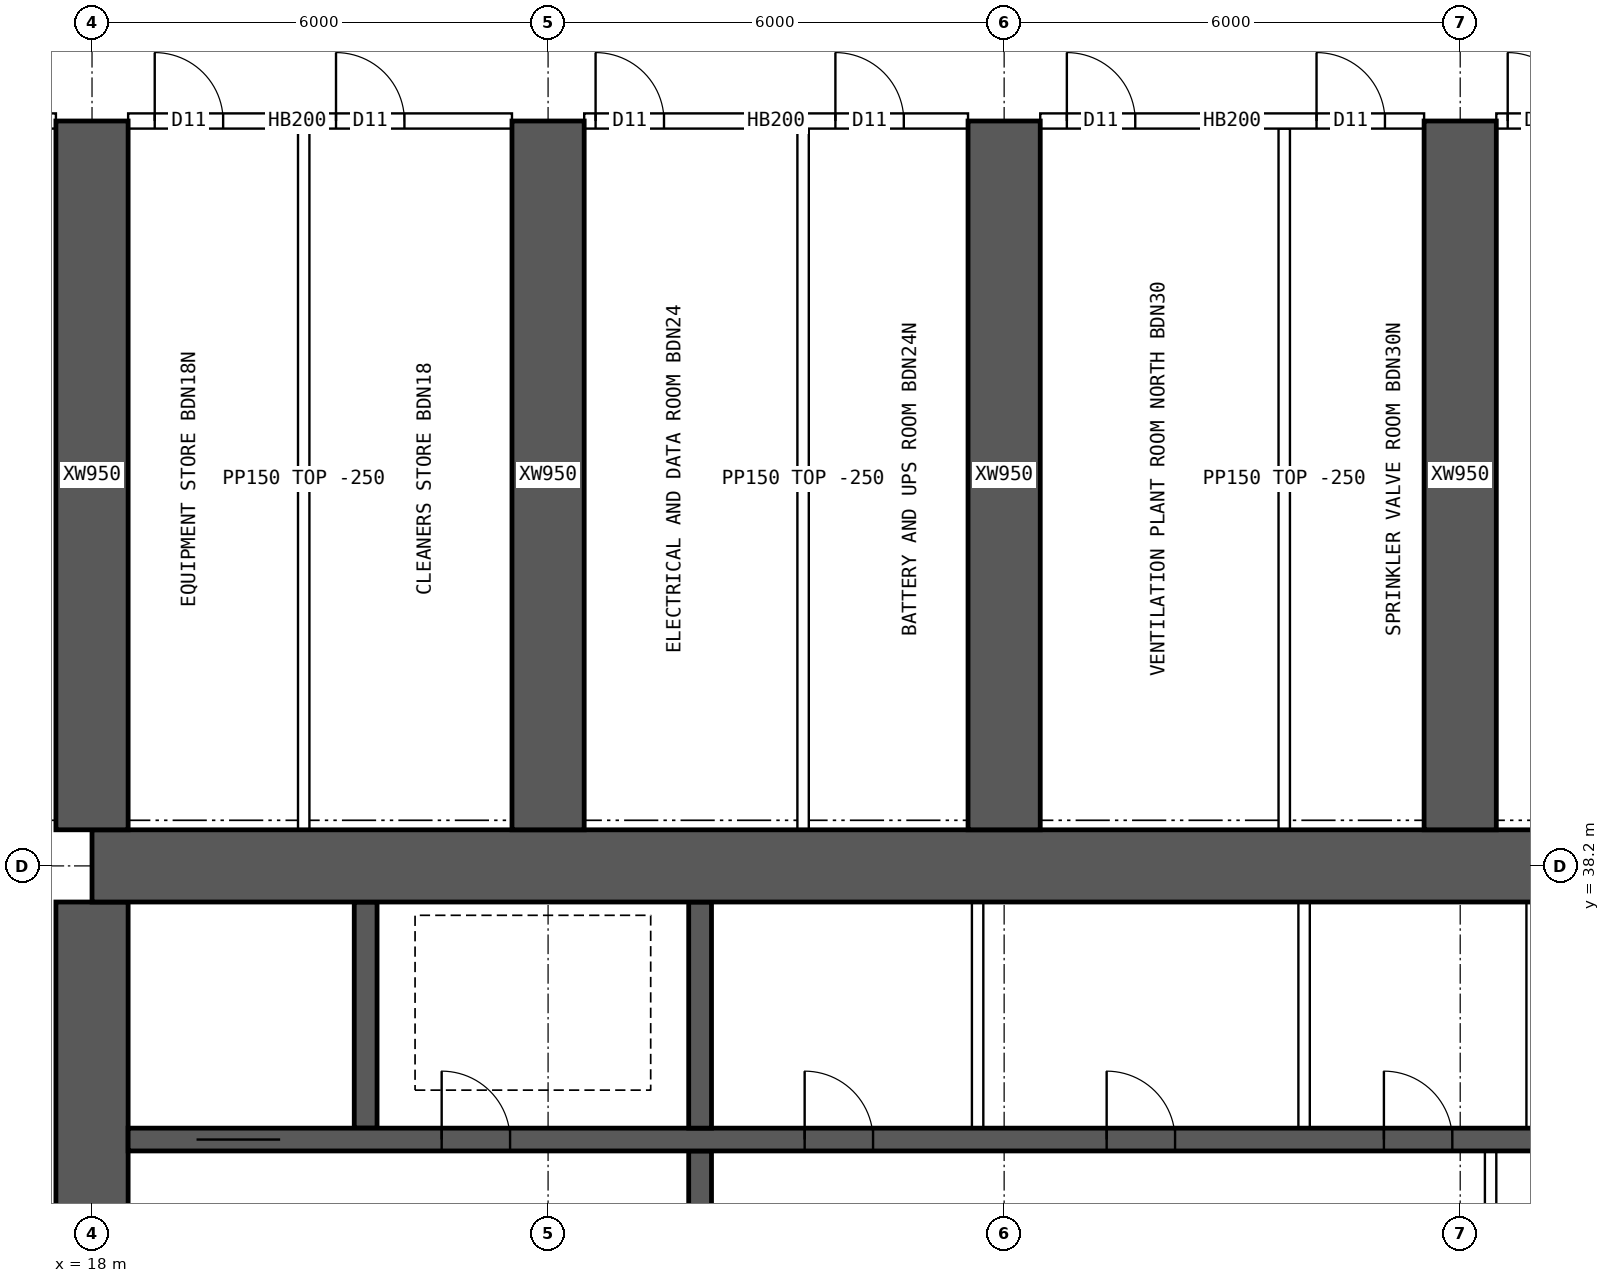
"""IFC4 building model, lengths in metres.
Left out: names, types, materials, properties, quantities, classifications, styles, units other than length and angle.
Written with IfcOpenShell. Run it as: python <this file> out.ifc"""

import sys

from ifc_helpers import new_model, si_unit, direction, frame, frame_2d, origin, place, context, subcontext, project, spatial, rectangle, extrude, element, fill, save


model = new_model("IFC4")
c1 = context("Model", 3, precision=1e-05, world=origin(), true_north=direction((0.0, 1.0)))
c2 = subcontext(c1, "Body", "Model", "MODEL_VIEW")
j1 = project(units=[si_unit("LENGTHUNIT", "METRE"), si_unit("PLANEANGLEUNIT", "RADIAN")], contexts=[c1])
p1 = place(None, origin())
s1 = spatial("IfcSite", under=j1, at=p1, CompositionType="ELEMENT")
p2 = place(p1, origin())
s2 = spatial("IfcBuilding", under=s1, at=p2, CompositionType="ELEMENT")
p3 = place(p2, frame((0.0, 0.0, 114.4)))
s3 = spatial("IfcBuildingStorey", under=s2, at=p3, CompositionType="ELEMENT", Elevation=114.4)
p4 = place(p3, frame((18.0, 38.2, 0.0), z_axis=(0.0, 0.0, 1.0), x_axis=(1.0, 0.0, 0.0)))
e1 = element("IfcWall", 1, at=p4, inside=s3, PredefinedType="SHEAR", context=c2, shape_type="SweptSolid", body=[
    extrude(rectangle(XDim=48.0, YDim=0.95, at=frame_2d((24.0, 0.0))), origin(), (0.0, 0.0, 1.0), 3.75),
])
p5 = place(p3, frame((18.0, 26.275, 0.0), z_axis=(0.0, 0.0, 1.0), x_axis=(0.0, 1.0, 0.0)))
e2 = element("IfcWall", 2, at=p5, inside=s3, PredefinedType="SHEAR", context=c2, shape_type="SweptSolid", body=[
    extrude(rectangle(XDim=11.45, YDim=0.95, at=frame_2d((5.725, 0.0))), origin(), (0.0, 0.0, 1.0), 3.75),
])
p6 = place(p5, frame((5.025, 0.0, 0.0)))
e3 = element("IfcOpeningElement", 3, at=p6, cuts=e2, PredefinedType="OPENING", context=c2, shape_type="SweptSolid", body=[
    extrude(rectangle(XDim=1.2, YDim=2.1, at=frame_2d((0.6, 1.05))), frame((0.0, 0.485, 0.0), z_axis=(0.0, -1.0, 0.0), x_axis=(1.0, 0.0, 0.0)), (0.0, 0.0, 1.0), 0.97),
])
p7 = place(p3, frame((18.475, 34.6, 0.0), z_axis=(0.0, 0.0, 1.0), x_axis=(1.0, 0.0, 0.0)))
e4 = element("IfcWall", 4, at=p7, inside=s3, PredefinedType="SHEAR", context=c2, shape_type="SweptSolid", body=[
    extrude(rectangle(XDim=47.05, YDim=0.3, at=frame_2d((23.525, 0.0))), origin(), (0.0, 0.0, 1.0), 3.75),
])
p8 = place(p7, frame((0.9, 0.0, 0.0)))
e5 = element("IfcOpeningElement", 5, at=p8, cuts=e4, PredefinedType="OPENING", context=c2, shape_type="SweptSolid", body=[
    extrude(rectangle(XDim=1.1, YDim=2.1, at=frame_2d((0.55, 1.05))), frame((0.0, 0.16, 0.0), z_axis=(0.0, -1.0, 0.0), x_axis=(1.0, 0.0, 0.0)), (0.0, 0.0, 1.0), 0.32),
])
p9 = place(p7, frame((45.05, 0.0, 0.0)))
e6 = element("IfcOpeningElement", 6, at=p9, cuts=e4, PredefinedType="OPENING", context=c2, shape_type="SweptSolid", body=[
    extrude(rectangle(XDim=1.1, YDim=2.1, at=frame_2d((0.55, 1.05))), frame((0.0, 0.16, 0.0), z_axis=(0.0, -1.0, 0.0), x_axis=(1.0, 0.0, 0.0)), (0.0, 0.0, 1.0), 0.32),
])
p10 = place(p7, frame((4.125, 0.0, 0.0)))
e7 = element("IfcOpeningElement", 7, at=p10, cuts=e4, PredefinedType="OPENING", context=c2, shape_type="SweptSolid", body=[
    extrude(rectangle(XDim=0.9, YDim=2.1, at=frame_2d((0.45, 1.05))), frame((0.0, 0.16, 0.0), z_axis=(0.0, -1.0, 0.0), x_axis=(1.0, 0.0, 0.0)), (0.0, 0.0, 1.0), 0.32),
])
p11 = place(p7, frame((42.025, 0.0, 0.0)))
e8 = element("IfcOpeningElement", 8, at=p11, cuts=e4, PredefinedType="OPENING", context=c2, shape_type="SweptSolid", body=[
    extrude(rectangle(XDim=0.9, YDim=2.1, at=frame_2d((0.45, 1.05))), frame((0.0, 0.16, 0.0), z_axis=(0.0, -1.0, 0.0), x_axis=(1.0, 0.0, 0.0)), (0.0, 0.0, 1.0), 0.32),
])
p12 = place(p7, frame((8.9, 0.0, 0.0)))
e9 = element("IfcOpeningElement", 9, at=p12, cuts=e4, PredefinedType="OPENING", context=c2, shape_type="SweptSolid", body=[
    extrude(rectangle(XDim=0.9, YDim=2.1, at=frame_2d((0.45, 1.05))), frame((0.0, 0.16, 0.0), z_axis=(0.0, -1.0, 0.0), x_axis=(1.0, 0.0, 0.0)), (0.0, 0.0, 1.0), 0.32),
])
p13 = place(p7, frame((12.874, 0.0, 0.0)))
e10 = element("IfcOpeningElement", 10, at=p13, cuts=e4, PredefinedType="OPENING", context=c2, shape_type="SweptSolid", body=[
    extrude(rectangle(XDim=0.9, YDim=2.1, at=frame_2d((0.45, 1.05))), frame((0.0, 0.16, 0.0), z_axis=(0.0, -1.0, 0.0), x_axis=(1.0, 0.0, 0.0)), (0.0, 0.0, 1.0), 0.32),
])
p14 = place(p7, frame((16.521, 0.0, 0.0)))
e11 = element("IfcOpeningElement", 11, at=p14, cuts=e4, PredefinedType="OPENING", context=c2, shape_type="SweptSolid", body=[
    extrude(rectangle(XDim=0.9, YDim=2.1, at=frame_2d((0.45, 1.05))), frame((0.0, 0.16, 0.0), z_axis=(0.0, -1.0, 0.0), x_axis=(1.0, 0.0, 0.0)), (0.0, 0.0, 1.0), 0.32),
])
p15 = place(p7, frame((20.28, 0.0, 0.0)))
e12 = element("IfcOpeningElement", 12, at=p15, cuts=e4, PredefinedType="OPENING", context=c2, shape_type="SweptSolid", body=[
    extrude(rectangle(XDim=0.9, YDim=2.1, at=frame_2d((0.45, 1.05))), frame((0.0, 0.16, 0.0), z_axis=(0.0, -1.0, 0.0), x_axis=(1.0, 0.0, 0.0)), (0.0, 0.0, 1.0), 0.32),
])
p16 = place(p7, frame((24.686, 0.0, 0.0)))
e13 = element("IfcOpeningElement", 13, at=p16, cuts=e4, PredefinedType="OPENING", context=c2, shape_type="SweptSolid", body=[
    extrude(rectangle(XDim=0.9, YDim=2.1, at=frame_2d((0.45, 1.05))), frame((0.0, 0.16, 0.0), z_axis=(0.0, -1.0, 0.0), x_axis=(1.0, 0.0, 0.0)), (0.0, 0.0, 1.0), 0.32),
])
p17 = place(p7, frame((27.483, 0.0, 0.0)))
e14 = element("IfcOpeningElement", 14, at=p17, cuts=e4, PredefinedType="OPENING", context=c2, shape_type="SweptSolid", body=[
    extrude(rectangle(XDim=0.9, YDim=2.1, at=frame_2d((0.45, 1.05))), frame((0.0, 0.16, 0.0), z_axis=(0.0, -1.0, 0.0), x_axis=(1.0, 0.0, 0.0)), (0.0, 0.0, 1.0), 0.32),
])
p18 = place(p7, frame((29.856, 0.0, 0.0)))
e15 = element("IfcOpeningElement", 15, at=p18, cuts=e4, PredefinedType="OPENING", context=c2, shape_type="SweptSolid", body=[
    extrude(rectangle(XDim=0.9, YDim=2.1, at=frame_2d((0.45, 1.05))), frame((0.0, 0.16, 0.0), z_axis=(0.0, -1.0, 0.0), x_axis=(1.0, 0.0, 0.0)), (0.0, 0.0, 1.0), 0.32),
])
p19 = place(p7, frame((33.706, 0.0, 0.0)))
e16 = element("IfcOpeningElement", 16, at=p19, cuts=e4, PredefinedType="OPENING", context=c2, shape_type="SweptSolid", body=[
    extrude(rectangle(XDim=0.9, YDim=2.1, at=frame_2d((0.45, 1.05))), frame((0.0, 0.16, 0.0), z_axis=(0.0, -1.0, 0.0), x_axis=(1.0, 0.0, 0.0)), (0.0, 0.0, 1.0), 0.32),
])
p20 = place(p7, frame((37.454, 0.0, 0.0)))
e17 = element("IfcOpeningElement", 17, at=p20, cuts=e4, PredefinedType="OPENING", context=c2, shape_type="SweptSolid", body=[
    extrude(rectangle(XDim=0.9, YDim=2.1, at=frame_2d((0.45, 1.05))), frame((0.0, 0.16, 0.0), z_axis=(0.0, -1.0, 0.0), x_axis=(1.0, 0.0, 0.0)), (0.0, 0.0, 1.0), 0.32),
])
p21 = place(p3, frame((26.0, 30.55, 0.0), z_axis=(0.0, 0.0, 1.0), x_axis=(0.0, 1.0, 0.0)))
e18 = element("IfcWall", 18, at=p21, inside=s3, PredefinedType="SHEAR", context=c2, shape_type="SweptSolid", body=[
    extrude(rectangle(XDim=3.9, YDim=0.3, at=frame_2d((1.95, 0.0))), origin(), (0.0, 0.0, 1.0), 3.75),
])
p22 = place(p21, frame((1.4, 0.0, 0.0)))
e19 = element("IfcOpeningElement", 19, at=p22, cuts=e18, PredefinedType="OPENING", context=c2, shape_type="SweptSolid", body=[
    extrude(rectangle(XDim=1.2, YDim=2.1, at=frame_2d((0.6, 1.05))), frame((0.0, 0.16, 0.0), z_axis=(0.0, -1.0, 0.0), x_axis=(1.0, 0.0, 0.0)), (0.0, 0.0, 1.0), 0.32),
])
for number, where, z_axis, x_axis in (
    (20, (21.6, 34.75, 0.0), (0.0, 0.0, 1.0), (0.0, 1.0, 0.0)),
    (21, (26.0, 34.75, 0.0), (0.0, 0.0, 1.0), (0.0, 1.0, 0.0)),
):
    element("IfcWall", number, at=place(p3, frame(where, z_axis=z_axis, x_axis=x_axis)), inside=s3, PredefinedType="SHEAR", context=c2, shape_type="SweptSolid", body=[
        extrude(rectangle(XDim=2.975, YDim=0.3, at=frame_2d((1.488, 0.0))), origin(), (0.0, 0.0, 1.0), 3.75),
    ])
for number, where, z_axis, x_axis in (
    (22, (18.0, 38.675, 0.0), (0.0, 0.0, 1.0), (0.0, 1.0, 0.0)),
    (23, (24.0, 38.675, 0.0), (0.0, 0.0, 1.0), (0.0, 1.0, 0.0)),
    (24, (30.0, 38.675, 0.0), (0.0, 0.0, 1.0), (0.0, 1.0, 0.0)),
    (25, (36.0, 38.675, 0.0), (0.0, 0.0, 1.0), (0.0, 1.0, 0.0)),
):
    element("IfcWall", number, at=place(p3, frame(where, z_axis=z_axis, x_axis=x_axis)), inside=s3, PredefinedType="SHEAR", context=c2, shape_type="SweptSolid", body=[
        extrude(rectangle(XDim=9.325, YDim=0.95, at=frame_2d((4.663, 0.0))), origin(), (0.0, 0.0, 1.0), 3.75),
    ])
p23 = place(p3, frame((36.4, 30.55, 0.0), z_axis=(0.0, 0.0, 1.0), x_axis=(0.0, 1.0, 0.0)))
e26 = element("IfcWall", 26, at=p23, inside=s3, PredefinedType="SOLIDWALL", context=c2, shape_type="SweptSolid", body=[
    extrude(rectangle(XDim=3.9, YDim=0.15, at=frame_2d((1.95, 0.0))), origin(), (0.0, 0.0, 1.0), 3.5),
])
p24 = place(p23, frame((1.15, 0.0, 0.0)))
e27 = element("IfcOpeningElement", 27, at=p24, cuts=e26, PredefinedType="OPENING", context=c2, shape_type="SweptSolid", body=[
    extrude(rectangle(XDim=1.6, YDim=2.1, at=frame_2d((0.8, 1.05))), frame((0.0, 0.085, 0.0), z_axis=(0.0, -1.0, 0.0), x_axis=(1.0, 0.0, 0.0)), (0.0, 0.0, 1.0), 0.17),
])
for number, where, z_axis, x_axis in (
    (28, (29.651, 34.75, 0.0), (0.0, 0.0, 1.0), (0.0, 1.0, 0.0)),
    (29, (33.946, 34.75, 0.0), (0.0, 0.0, 1.0), (0.0, 1.0, 0.0)),
    (30, (36.946, 34.75, 0.0), (0.0, 0.0, 1.0), (0.0, 1.0, 0.0)),
):
    element("IfcWall", number, at=place(p3, frame(where, z_axis=z_axis, x_axis=x_axis)), inside=s3, PredefinedType="SOLIDWALL", context=c2, shape_type="SweptSolid", body=[
        extrude(rectangle(XDim=2.975, YDim=0.15, at=frame_2d((1.488, 0.0))), origin(), (0.0, 0.0, 1.0), 3.5),
    ])
p25 = place(p3, frame((12.475, 48.0, 0.0), z_axis=(0.0, 0.0, 1.0), x_axis=(1.0, 0.0, 0.0)))
e31 = element("IfcWall", 31, at=p25, inside=s3, PredefinedType="SOLIDWALL", context=c2, shape_type="SweptSolid", body=[
    extrude(rectangle(XDim=5.05, YDim=0.2, at=frame_2d((2.525, 0.0))), origin(), (0.0, 0.0, 1.0), 3.5),
])
p26 = place(p25, frame((3.325, 0.0, 0.0)))
e32 = element("IfcOpeningElement", 32, at=p26, cuts=e31, PredefinedType="OPENING", context=c2, shape_type="SweptSolid", body=[
    extrude(rectangle(XDim=1.6, YDim=2.1, at=frame_2d((0.8, 1.05))), frame((0.0, 0.11, 0.0), z_axis=(0.0, -1.0, 0.0), x_axis=(1.0, 0.0, 0.0)), (0.0, 0.0, 1.0), 0.22),
])
p27 = place(p3, frame((18.475, 48.0, 0.0), z_axis=(0.0, 0.0, 1.0), x_axis=(1.0, 0.0, 0.0)))
e33 = element("IfcWall", 33, at=p27, inside=s3, PredefinedType="SOLIDWALL", context=c2, shape_type="SweptSolid", body=[
    extrude(rectangle(XDim=5.05, YDim=0.2, at=frame_2d((2.525, 0.0))), origin(), (0.0, 0.0, 1.0), 3.5),
])
p28 = place(p27, frame((0.35, 0.0, 0.0)))
e34 = element("IfcOpeningElement", 34, at=p28, cuts=e33, PredefinedType="OPENING", context=c2, shape_type="SweptSolid", body=[
    extrude(rectangle(XDim=0.9, YDim=2.1, at=frame_2d((0.45, 1.05))), frame((0.0, 0.11, 0.0), z_axis=(0.0, -1.0, 0.0), x_axis=(1.0, 0.0, 0.0)), (0.0, 0.0, 1.0), 0.22),
])
p29 = place(p27, frame((2.735, 0.0, 0.0)))
e35 = element("IfcOpeningElement", 35, at=p29, cuts=e33, PredefinedType="OPENING", context=c2, shape_type="SweptSolid", body=[
    extrude(rectangle(XDim=0.9, YDim=2.1, at=frame_2d((0.45, 1.05))), frame((0.0, 0.11, 0.0), z_axis=(0.0, -1.0, 0.0), x_axis=(1.0, 0.0, 0.0)), (0.0, 0.0, 1.0), 0.22),
])
p30 = place(p3, frame((24.475, 48.0, 0.0), z_axis=(0.0, 0.0, 1.0), x_axis=(1.0, 0.0, 0.0)))
e36 = element("IfcWall", 36, at=p30, inside=s3, PredefinedType="SOLIDWALL", context=c2, shape_type="SweptSolid", body=[
    extrude(rectangle(XDim=5.05, YDim=0.2, at=frame_2d((2.525, 0.0))), origin(), (0.0, 0.0, 1.0), 3.5),
])
p31 = place(p30, frame((0.15, 0.0, 0.0)))
e37 = element("IfcOpeningElement", 37, at=p31, cuts=e36, PredefinedType="OPENING", context=c2, shape_type="SweptSolid", body=[
    extrude(rectangle(XDim=0.9, YDim=2.1, at=frame_2d((0.45, 1.05))), frame((0.0, 0.11, 0.0), z_axis=(0.0, -1.0, 0.0), x_axis=(1.0, 0.0, 0.0)), (0.0, 0.0, 1.0), 0.22),
])
p32 = place(p30, frame((3.305, 0.0, 0.0)))
e38 = element("IfcOpeningElement", 38, at=p32, cuts=e36, PredefinedType="OPENING", context=c2, shape_type="SweptSolid", body=[
    extrude(rectangle(XDim=0.9, YDim=2.1, at=frame_2d((0.45, 1.05))), frame((0.0, 0.11, 0.0), z_axis=(0.0, -1.0, 0.0), x_axis=(1.0, 0.0, 0.0)), (0.0, 0.0, 1.0), 0.22),
])
p33 = place(p3, frame((30.475, 48.0, 0.0), z_axis=(0.0, 0.0, 1.0), x_axis=(1.0, 0.0, 0.0)))
e39 = element("IfcWall", 39, at=p33, inside=s3, PredefinedType="SOLIDWALL", context=c2, shape_type="SweptSolid", body=[
    extrude(rectangle(XDim=5.05, YDim=0.2, at=frame_2d((2.525, 0.0))), origin(), (0.0, 0.0, 1.0), 3.5),
])
p34 = place(p33, frame((0.35, 0.0, 0.0)))
e40 = element("IfcOpeningElement", 40, at=p34, cuts=e39, PredefinedType="OPENING", context=c2, shape_type="SweptSolid", body=[
    extrude(rectangle(XDim=0.9, YDim=2.1, at=frame_2d((0.45, 1.05))), frame((0.0, 0.11, 0.0), z_axis=(0.0, -1.0, 0.0), x_axis=(1.0, 0.0, 0.0)), (0.0, 0.0, 1.0), 0.22),
])
p35 = place(p33, frame((3.635, 0.0, 0.0)))
e41 = element("IfcOpeningElement", 41, at=p35, cuts=e39, PredefinedType="OPENING", context=c2, shape_type="SweptSolid", body=[
    extrude(rectangle(XDim=0.9, YDim=2.1, at=frame_2d((0.45, 1.05))), frame((0.0, 0.11, 0.0), z_axis=(0.0, -1.0, 0.0), x_axis=(1.0, 0.0, 0.0)), (0.0, 0.0, 1.0), 0.22),
])
p36 = place(p3, frame((36.475, 48.0, 0.0), z_axis=(0.0, 0.0, 1.0), x_axis=(1.0, 0.0, 0.0)))
e42 = element("IfcWall", 42, at=p36, inside=s3, PredefinedType="SOLIDWALL", context=c2, shape_type="SweptSolid", body=[
    extrude(rectangle(XDim=5.05, YDim=0.2, at=frame_2d((2.525, 0.0))), origin(), (0.0, 0.0, 1.0), 3.5),
])
p37 = place(p36, frame((0.15, 0.0, 0.0)))
e43 = element("IfcOpeningElement", 43, at=p37, cuts=e42, PredefinedType="OPENING", context=c2, shape_type="SweptSolid", body=[
    extrude(rectangle(XDim=0.9, YDim=2.1, at=frame_2d((0.45, 1.05))), frame((0.0, 0.11, 0.0), z_axis=(0.0, -1.0, 0.0), x_axis=(1.0, 0.0, 0.0)), (0.0, 0.0, 1.0), 0.22),
])
p38 = place(p36, frame((3.255, 0.0, 0.0)))
e44 = element("IfcOpeningElement", 44, at=p38, cuts=e42, PredefinedType="OPENING", context=c2, shape_type="SweptSolid", body=[
    extrude(rectangle(XDim=0.9, YDim=2.1, at=frame_2d((0.45, 1.05))), frame((0.0, 0.11, 0.0), z_axis=(0.0, -1.0, 0.0), x_axis=(1.0, 0.0, 0.0)), (0.0, 0.0, 1.0), 0.22),
])
for number, where, z_axis, x_axis in (
    (45, (20.785, 38.675, 0.0), (0.0, 0.0, 1.0), (0.0, 1.0, 0.0)),
    (46, (27.355, 38.675, 0.0), (0.0, 0.0, 1.0), (0.0, 1.0, 0.0)),
    (47, (33.685, 38.675, 0.0), (0.0, 0.0, 1.0), (0.0, 1.0, 0.0)),
):
    element("IfcWall", number, at=place(p3, frame(where, z_axis=z_axis, x_axis=x_axis)), inside=s3, PredefinedType="PARTITIONING", context=c2, shape_type="SweptSolid", body=[
        extrude(rectangle(XDim=9.225, YDim=0.15, at=frame_2d((4.612, 0.0))), origin(), (0.0, 0.0, 1.0), 3.5),
    ])
p39 = place(p8, origin())
e48 = element("IfcDoor", 48, at=p39, inside=s3, OperationType="DOUBLE_DOOR_SLIDING", PredefinedType="DOOR", context=c2, shape_type="SweptSolid", body=[
    extrude(rectangle(XDim=1.1, YDim=2.1, at=frame_2d((0.55, 1.05))), frame((0.0, 0.025, 0.0), z_axis=(0.0, -1.0, 0.0), x_axis=(1.0, 0.0, 0.0)), (0.0, 0.0, 1.0), 0.05),
])
fill(e5, e48)
p40 = place(p10, origin())
e49 = element("IfcDoor", 49, at=p40, inside=s3, OperationType="SINGLE_SWING_LEFT", PredefinedType="DOOR", context=c2, shape_type="SweptSolid", body=[
    extrude(rectangle(XDim=0.9, YDim=2.1, at=frame_2d((0.45, 1.05))), frame((0.0, 0.025, 0.0), z_axis=(0.0, -1.0, 0.0), x_axis=(1.0, 0.0, 0.0)), (0.0, 0.0, 1.0), 0.05),
])
fill(e7, e49)
p41 = place(p12, origin())
e50 = element("IfcDoor", 50, at=p41, inside=s3, OperationType="SINGLE_SWING_LEFT", PredefinedType="DOOR", context=c2, shape_type="SweptSolid", body=[
    extrude(rectangle(XDim=0.9, YDim=2.1, at=frame_2d((0.45, 1.05))), frame((0.0, 0.025, 0.0), z_axis=(0.0, -1.0, 0.0), x_axis=(1.0, 0.0, 0.0)), (0.0, 0.0, 1.0), 0.05),
])
fill(e9, e50)
p42 = place(p13, origin())
e51 = element("IfcDoor", 51, at=p42, inside=s3, OperationType="SINGLE_SWING_LEFT", PredefinedType="DOOR", context=c2, shape_type="SweptSolid", body=[
    extrude(rectangle(XDim=0.9, YDim=2.1, at=frame_2d((0.45, 1.05))), frame((0.0, 0.025, 0.0), z_axis=(0.0, -1.0, 0.0), x_axis=(1.0, 0.0, 0.0)), (0.0, 0.0, 1.0), 0.05),
])
fill(e10, e51)
p43 = place(p14, origin())
e52 = element("IfcDoor", 52, at=p43, inside=s3, OperationType="SINGLE_SWING_LEFT", PredefinedType="DOOR", context=c2, shape_type="SweptSolid", body=[
    extrude(rectangle(XDim=0.9, YDim=2.1, at=frame_2d((0.45, 1.05))), frame((0.0, 0.025, 0.0), z_axis=(0.0, -1.0, 0.0), x_axis=(1.0, 0.0, 0.0)), (0.0, 0.0, 1.0), 0.05),
])
fill(e11, e52)
p44 = place(p28, origin())
e53 = element("IfcDoor", 53, at=p44, inside=s3, OperationType="SINGLE_SWING_LEFT", PredefinedType="DOOR", context=c2, shape_type="SweptSolid", body=[
    extrude(rectangle(XDim=0.9, YDim=2.1, at=frame_2d((0.45, 1.05))), frame((0.0, 0.025, 0.0), z_axis=(0.0, -1.0, 0.0), x_axis=(1.0, 0.0, 0.0)), (0.0, 0.0, 1.0), 0.05),
])
fill(e34, e53)
p45 = place(p29, origin())
e54 = element("IfcDoor", 54, at=p45, inside=s3, OperationType="SINGLE_SWING_LEFT", PredefinedType="DOOR", context=c2, shape_type="SweptSolid", body=[
    extrude(rectangle(XDim=0.9, YDim=2.1, at=frame_2d((0.45, 1.05))), frame((0.0, 0.025, 0.0), z_axis=(0.0, -1.0, 0.0), x_axis=(1.0, 0.0, 0.0)), (0.0, 0.0, 1.0), 0.05),
])
fill(e35, e54)
p46 = place(p31, origin())
e55 = element("IfcDoor", 55, at=p46, inside=s3, OperationType="SINGLE_SWING_LEFT", PredefinedType="DOOR", context=c2, shape_type="SweptSolid", body=[
    extrude(rectangle(XDim=0.9, YDim=2.1, at=frame_2d((0.45, 1.05))), frame((0.0, 0.025, 0.0), z_axis=(0.0, -1.0, 0.0), x_axis=(1.0, 0.0, 0.0)), (0.0, 0.0, 1.0), 0.05),
])
fill(e37, e55)
p47 = place(p32, origin())
e56 = element("IfcDoor", 56, at=p47, inside=s3, OperationType="SINGLE_SWING_LEFT", PredefinedType="DOOR", context=c2, shape_type="SweptSolid", body=[
    extrude(rectangle(XDim=0.9, YDim=2.1, at=frame_2d((0.45, 1.05))), frame((0.0, 0.025, 0.0), z_axis=(0.0, -1.0, 0.0), x_axis=(1.0, 0.0, 0.0)), (0.0, 0.0, 1.0), 0.05),
])
fill(e38, e56)
p48 = place(p34, origin())
e57 = element("IfcDoor", 57, at=p48, inside=s3, OperationType="SINGLE_SWING_LEFT", PredefinedType="DOOR", context=c2, shape_type="SweptSolid", body=[
    extrude(rectangle(XDim=0.9, YDim=2.1, at=frame_2d((0.45, 1.05))), frame((0.0, 0.025, 0.0), z_axis=(0.0, -1.0, 0.0), x_axis=(1.0, 0.0, 0.0)), (0.0, 0.0, 1.0), 0.05),
])
fill(e40, e57)
p49 = place(p35, origin())
e58 = element("IfcDoor", 58, at=p49, inside=s3, OperationType="SINGLE_SWING_LEFT", PredefinedType="DOOR", context=c2, shape_type="SweptSolid", body=[
    extrude(rectangle(XDim=0.9, YDim=2.1, at=frame_2d((0.45, 1.05))), frame((0.0, 0.025, 0.0), z_axis=(0.0, -1.0, 0.0), x_axis=(1.0, 0.0, 0.0)), (0.0, 0.0, 1.0), 0.05),
])
fill(e41, e58)
p50 = place(p37, origin())
e59 = element("IfcDoor", 59, at=p50, inside=s3, OperationType="SINGLE_SWING_LEFT", PredefinedType="DOOR", context=c2, shape_type="SweptSolid", body=[
    extrude(rectangle(XDim=0.9, YDim=2.1, at=frame_2d((0.45, 1.05))), frame((0.0, 0.025, 0.0), z_axis=(0.0, -1.0, 0.0), x_axis=(1.0, 0.0, 0.0)), (0.0, 0.0, 1.0), 0.05),
])
fill(e43, e59)
save(model, sys.argv[1])
